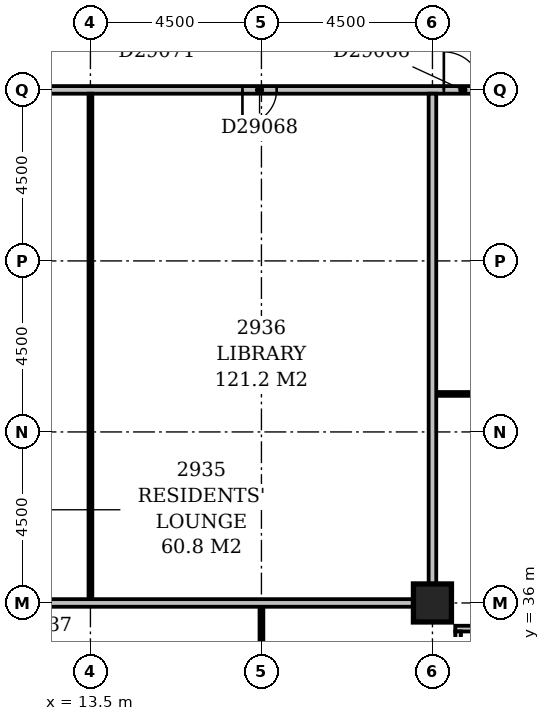
"""IFC4 building model, lengths in metres.
Left out: names, types, materials, properties, quantities, classifications, styles, units other than length and angle.
Written with IfcOpenShell. Run it as: python <this file> out.ifc"""

import sys

from ifc_helpers import new_model, si_unit, direction, frame, frame_2d, origin, origin_2d, place, context, subcontext, project, spatial, rectangle, extrude, element, fill, save


model = new_model("IFC4")
c1 = context("Model", 3, precision=1e-05, world=origin(), true_north=direction((0.0, 1.0)))
c2 = subcontext(c1, "Body", "Model", "MODEL_VIEW")
j1 = project(units=[si_unit("LENGTHUNIT", "METRE"), si_unit("PLANEANGLEUNIT", "RADIAN")], contexts=[c1])
p1 = place(None, origin())
s1 = spatial("IfcSite", under=j1, at=p1, CompositionType="ELEMENT")
p2 = place(p1, origin())
s2 = spatial("IfcBuilding", under=s1, at=p2, CompositionType="ELEMENT")
p3 = place(p2, frame((0.0, 0.0, 119.6)))
s3 = spatial("IfcBuildingStorey", under=s2, at=p3, CompositionType="ELEMENT", Elevation=119.6)
p4 = place(p3, frame((22.5, 36.0, -0.3), z_axis=(0.0, 0.0, 1.0), x_axis=(1.0, 0.0, 0.0)))
e1 = element("IfcColumn", 1, at=p4, inside=s3, PredefinedType="COLUMN", context=c2, shape_type="SweptSolid", body=[
    extrude(rectangle(XDim=1.0, YDim=1.0, at=origin_2d()), origin(), (0.0, 0.0, 1.0), 3.6),
])
p5 = place(p3, frame((23.175, 17.4, 0.0), z_axis=(0.0, 0.0, 1.0), x_axis=(0.0, 1.0, 0.0)))
e2 = element("IfcWall", 2, at=p5, inside=s3, PredefinedType="STANDARD", context=c2, shape_type="SweptSolid", body=[
    extrude(rectangle(XDim=17.85, YDim=0.15, at=frame_2d((8.925, 0.0))), origin(), (0.0, 0.0, 1.0), 2.7),
])
p6 = place(p5, frame((1.65, 0.0, 0.6)))
e3 = element("IfcOpeningElement", 3, at=p6, cuts=e2, PredefinedType="OPENING", context=c2, shape_type="SweptSolid", body=[
    extrude(rectangle(XDim=2.4, YDim=1.8, at=frame_2d((1.2, 0.9))), frame((0.0, 0.087, 0.0), z_axis=(0.0, -1.0, 0.0), x_axis=(1.0, 0.0, 0.0)), (0.0, 0.0, 1.0), 0.174),
])
p7 = place(p5, frame((6.15, 0.0, 0.6)))
e4 = element("IfcOpeningElement", 4, at=p7, cuts=e2, PredefinedType="OPENING", context=c2, shape_type="SweptSolid", body=[
    extrude(rectangle(XDim=2.4, YDim=1.8, at=frame_2d((1.2, 0.9))), frame((0.0, 0.087, 0.0), z_axis=(0.0, -1.0, 0.0), x_axis=(1.0, 0.0, 0.0)), (0.0, 0.0, 1.0), 0.174),
])
p8 = place(p5, frame((10.65, 0.0, 0.6)))
e5 = element("IfcOpeningElement", 5, at=p8, cuts=e2, PredefinedType="OPENING", context=c2, shape_type="SweptSolid", body=[
    extrude(rectangle(XDim=2.4, YDim=1.8, at=frame_2d((1.2, 0.9))), frame((0.0, 0.087, 0.0), z_axis=(0.0, -1.0, 0.0), x_axis=(1.0, 0.0, 0.0)), (0.0, 0.0, 1.0), 0.174),
])
p9 = place(p5, frame((17.13, 0.0, 0.6)))
e6 = element("IfcOpeningElement", 6, at=p9, cuts=e2, PredefinedType="OPENING", context=c2, shape_type="SweptSolid", body=[
    extrude(rectangle(XDim=0.45, YDim=1.8, at=frame_2d((0.225, 0.9))), frame((0.0, 0.087, 0.0), z_axis=(0.0, -1.0, 0.0), x_axis=(1.0, 0.0, 0.0)), (0.0, 0.0, 1.0), 0.174),
])
p10 = place(p3, frame((23.1, 35.325, 0.0), z_axis=(0.0, 0.0, 1.0), x_axis=(1.0, 0.0, 0.0)))
e7 = element("IfcWall", 7, at=p10, inside=s3, PredefinedType="STANDARD", context=c2, shape_type="SweptSolid", body=[
    extrude(rectangle(XDim=45.15, YDim=0.15, at=frame_2d((22.575, 0.0))), origin(), (0.0, 0.0, 1.0), 2.7),
])
p11 = place(p10, frame((0.45, 0.0, 0.6)))
e8 = element("IfcOpeningElement", 8, at=p11, cuts=e7, PredefinedType="OPENING", context=c2, shape_type="SweptSolid", body=[
    extrude(rectangle(XDim=2.4, YDim=1.8, at=frame_2d((1.2, 0.9))), frame((0.0, 0.087, 0.0), z_axis=(0.0, -1.0, 0.0), x_axis=(1.0, 0.0, 0.0)), (0.0, 0.0, 1.0), 0.174),
])
p12 = place(p10, frame((4.95, 0.0, 0.6)))
e9 = element("IfcOpeningElement", 9, at=p12, cuts=e7, PredefinedType="OPENING", context=c2, shape_type="SweptSolid", body=[
    extrude(rectangle(XDim=2.4, YDim=1.8, at=frame_2d((1.2, 0.9))), frame((0.0, 0.087, 0.0), z_axis=(0.0, -1.0, 0.0), x_axis=(1.0, 0.0, 0.0)), (0.0, 0.0, 1.0), 0.174),
])
p13 = place(p10, frame((9.225, 0.0, 0.6)))
e10 = element("IfcOpeningElement", 10, at=p13, cuts=e7, PredefinedType="OPENING", context=c2, shape_type="SweptSolid", body=[
    extrude(rectangle(XDim=1.5, YDim=1.8, at=frame_2d((0.75, 0.9))), frame((0.0, 0.087, 0.0), z_axis=(0.0, -1.0, 0.0), x_axis=(1.0, 0.0, 0.0)), (0.0, 0.0, 1.0), 0.174),
])
p14 = place(p10, frame((15.146, 0.0, 0.6)))
e11 = element("IfcOpeningElement", 11, at=p14, cuts=e7, PredefinedType="OPENING", context=c2, shape_type="SweptSolid", body=[
    extrude(rectangle(XDim=1.5, YDim=1.8, at=frame_2d((0.75, 0.9))), frame((0.0, 0.087, 0.0), z_axis=(0.0, -1.0, 0.0), x_axis=(1.0, 0.0, 0.0)), (0.0, 0.0, 1.0), 0.174),
])
p15 = place(p10, frame((18.45, 0.0, 0.6)))
e12 = element("IfcOpeningElement", 12, at=p15, cuts=e7, PredefinedType="OPENING", context=c2, shape_type="SweptSolid", body=[
    extrude(rectangle(XDim=2.4, YDim=1.8, at=frame_2d((1.2, 0.9))), frame((0.0, 0.087, 0.0), z_axis=(0.0, -1.0, 0.0), x_axis=(1.0, 0.0, 0.0)), (0.0, 0.0, 1.0), 0.174),
])
p16 = place(p10, frame((22.95, 0.0, 0.6)))
e13 = element("IfcOpeningElement", 13, at=p16, cuts=e7, PredefinedType="OPENING", context=c2, shape_type="SweptSolid", body=[
    extrude(rectangle(XDim=2.4, YDim=1.8, at=frame_2d((1.2, 0.9))), frame((0.0, 0.087, 0.0), z_axis=(0.0, -1.0, 0.0), x_axis=(1.0, 0.0, 0.0)), (0.0, 0.0, 1.0), 0.174),
])
p17 = place(p10, frame((27.45, 0.0, 0.6)))
e14 = element("IfcOpeningElement", 14, at=p17, cuts=e7, PredefinedType="OPENING", context=c2, shape_type="SweptSolid", body=[
    extrude(rectangle(XDim=2.4, YDim=1.8, at=frame_2d((1.2, 0.9))), frame((0.0, 0.087, 0.0), z_axis=(0.0, -1.0, 0.0), x_axis=(1.0, 0.0, 0.0)), (0.0, 0.0, 1.0), 0.174),
])
p18 = place(p10, frame((31.95, 0.0, 0.6)))
e15 = element("IfcOpeningElement", 15, at=p18, cuts=e7, PredefinedType="OPENING", context=c2, shape_type="SweptSolid", body=[
    extrude(rectangle(XDim=2.4, YDim=1.8, at=frame_2d((1.2, 0.9))), frame((0.0, 0.087, 0.0), z_axis=(0.0, -1.0, 0.0), x_axis=(1.0, 0.0, 0.0)), (0.0, 0.0, 1.0), 0.174),
])
p19 = place(p10, frame((36.45, 0.0, 0.6)))
e16 = element("IfcOpeningElement", 16, at=p19, cuts=e7, PredefinedType="OPENING", context=c2, shape_type="SweptSolid", body=[
    extrude(rectangle(XDim=2.4, YDim=1.8, at=frame_2d((1.2, 0.9))), frame((0.0, 0.087, 0.0), z_axis=(0.0, -1.0, 0.0), x_axis=(1.0, 0.0, 0.0)), (0.0, 0.0, 1.0), 0.174),
])
p20 = place(p10, frame((40.631, 0.0, 0.6)))
e17 = element("IfcOpeningElement", 17, at=p20, cuts=e7, PredefinedType="OPENING", context=c2, shape_type="SweptSolid", body=[
    extrude(rectangle(XDim=0.9, YDim=1.8, at=frame_2d((0.45, 0.9))), frame((0.0, 0.087, 0.0), z_axis=(0.0, -1.0, 0.0), x_axis=(1.0, 0.0, 0.0)), (0.0, 0.0, 1.0), 0.174),
])
p21 = place(p3, frame((18.0, 31.6, 0.0), z_axis=(0.0, 0.0, 1.0), x_axis=(0.0, 1.0, 0.0)))
e18 = element("IfcWall", 18, at=p21, inside=s3, PredefinedType="PARTITIONING", context=c2, shape_type="SweptSolid", body=[
    extrude(rectangle(XDim=4.3, YDim=0.1, at=frame_2d((2.15, 0.0))), origin(), (0.0, 0.0, 1.0), 3.3),
])
p22 = place(p21, frame((1.7, 0.0, 0.0)))
e19 = element("IfcOpeningElement", 19, at=p22, cuts=e18, PredefinedType="OPENING", context=c2, shape_type="SweptSolid", body=[
    extrude(rectangle(XDim=0.9, YDim=2.1, at=frame_2d((0.45, 1.05))), frame((0.0, 0.062, 0.0), z_axis=(0.0, -1.0, 0.0), x_axis=(1.0, 0.0, 0.0)), (0.0, 0.0, 1.0), 0.124),
])
p23 = place(p3, frame((9.1, 36.0, 0.0), z_axis=(0.0, 0.0, 1.0), x_axis=(1.0, 0.0, 0.0)))
e20 = element("IfcWall", 20, at=p23, inside=s3, PredefinedType="PARTITIONING", context=c2, shape_type="SweptSolid", body=[
    extrude(rectangle(XDim=12.9, YDim=0.2, at=frame_2d((6.45, 0.0))), origin(), (0.0, 0.0, 1.0), 3.3),
])
p24 = place(p3, frame((13.5, 36.1, 0.0), z_axis=(0.0, 0.0, 1.0), x_axis=(0.0, 1.0, 0.0)))
e21 = element("IfcWall", 21, at=p24, inside=s3, PredefinedType="PARTITIONING", context=c2, shape_type="SweptSolid", body=[
    extrude(rectangle(XDim=13.3, YDim=0.1, at=frame_2d((6.65, 0.0))), origin(), (0.0, 0.0, 1.0), 3.3),
])
p25 = place(p3, frame((22.5, 36.5, 0.0), z_axis=(0.0, 0.0, 1.0), x_axis=(0.0, 1.0, 0.0)))
e22 = element("IfcWall", 22, at=p25, inside=s3, PredefinedType="PARTITIONING", context=c2, shape_type="SweptSolid", body=[
    extrude(rectangle(XDim=12.9, YDim=0.2, at=frame_2d((6.45, 0.0))), origin(), (0.0, 0.0, 1.0), 3.3),
])
p26 = place(p3, frame((22.6, 41.5, 0.0), z_axis=(0.0, 0.0, 1.0), x_axis=(1.0, 0.0, 0.0)))
e23 = element("IfcWall", 23, at=p26, inside=s3, PredefinedType="PARTITIONING", context=c2, shape_type="SweptSolid", body=[
    extrude(rectangle(XDim=8.8, YDim=0.1, at=frame_2d((4.4, 0.0))), origin(), (0.0, 0.0, 1.0), 3.3),
])
p27 = place(p26, frame((1.7, 0.0, 0.0)))
e24 = element("IfcOpeningElement", 24, at=p27, cuts=e23, PredefinedType="OPENING", context=c2, shape_type="SweptSolid", body=[
    extrude(rectangle(XDim=0.9, YDim=2.1, at=frame_2d((0.45, 1.05))), frame((0.0, 0.062, 0.0), z_axis=(0.0, -1.0, 0.0), x_axis=(1.0, 0.0, 0.0)), (0.0, 0.0, 1.0), 0.124),
])
p28 = place(p26, frame((6.2, 0.0, 0.0)))
e25 = element("IfcOpeningElement", 25, at=p28, cuts=e23, PredefinedType="OPENING", context=c2, shape_type="SweptSolid", body=[
    extrude(rectangle(XDim=0.9, YDim=2.1, at=frame_2d((0.45, 1.05))), frame((0.0, 0.062, 0.0), z_axis=(0.0, -1.0, 0.0), x_axis=(1.0, 0.0, 0.0)), (0.0, 0.0, 1.0), 0.124),
])
p29 = place(p3, frame((9.1, 49.5, 0.0), z_axis=(0.0, 0.0, 1.0), x_axis=(1.0, 0.0, 0.0)))
e26 = element("IfcWall", 26, at=p29, inside=s3, PredefinedType="PARTITIONING", context=c2, shape_type="SweptSolid", body=[
    extrude(rectangle(XDim=41.55, YDim=0.2, at=frame_2d((20.775, 0.0))), origin(), (0.0, 0.0, 1.0), 3.3),
])
p30 = place(p29, frame((13.7, 0.0, 0.0)))
e27 = element("IfcOpeningElement", 27, at=p30, cuts=e26, PredefinedType="OPENING", context=c2, shape_type="SweptSolid", body=[
    extrude(rectangle(XDim=1.0, YDim=2.1, at=frame_2d((0.5, 1.05))), frame((0.0, 0.112, 0.0), z_axis=(0.0, -1.0, 0.0), x_axis=(1.0, 0.0, 0.0)), (0.0, 0.0, 1.0), 0.224),
])
p31 = place(p29, frame((27.8, 0.0, 0.0)))
e28 = element("IfcOpeningElement", 28, at=p31, cuts=e26, PredefinedType="OPENING", context=c2, shape_type="SweptSolid", body=[
    extrude(rectangle(XDim=1.0, YDim=2.1, at=frame_2d((0.5, 1.05))), frame((0.0, 0.112, 0.0), z_axis=(0.0, -1.0, 0.0), x_axis=(1.0, 0.0, 0.0)), (0.0, 0.0, 1.0), 0.224),
])
p32 = place(p29, frame((8.4, 0.0, 0.0)))
e29 = element("IfcOpeningElement", 29, at=p32, cuts=e26, PredefinedType="OPENING", context=c2, shape_type="SweptSolid", body=[
    extrude(rectangle(XDim=0.9, YDim=2.1, at=frame_2d((0.45, 1.05))), frame((0.0, 0.112, 0.0), z_axis=(0.0, -1.0, 0.0), x_axis=(1.0, 0.0, 0.0)), (0.0, 0.0, 1.0), 0.224),
])
p33 = place(p30, origin())
e30 = element("IfcDoor", 30, at=p33, inside=s3, OperationType="SINGLE_SWING_LEFT", PredefinedType="DOOR", context=c2, shape_type="SweptSolid", body=[
    extrude(rectangle(XDim=1.0, YDim=2.1, at=frame_2d((0.5, 1.05))), frame((0.0, 0.025, 0.0), z_axis=(0.0, -1.0, 0.0), x_axis=(1.0, 0.0, 0.0)), (0.0, 0.0, 1.0), 0.05),
])
fill(e27, e30)
p34 = place(p32, frame((0.9, 0.0, 0.0), z_axis=(0.0, 0.0, 1.0), x_axis=(-1.0, 0.0, 0.0)))
e31 = element("IfcDoor", 31, at=p34, inside=s3, OperationType="SINGLE_SWING_RIGHT", PredefinedType="DOOR", context=c2, shape_type="SweptSolid", body=[
    extrude(rectangle(XDim=0.9, YDim=2.1, at=frame_2d((0.45, 1.05))), frame((0.0, 0.025, 0.0), z_axis=(0.0, -1.0, 0.0), x_axis=(1.0, 0.0, 0.0)), (0.0, 0.0, 1.0), 0.05),
])
fill(e29, e31)
save(model, sys.argv[1])
